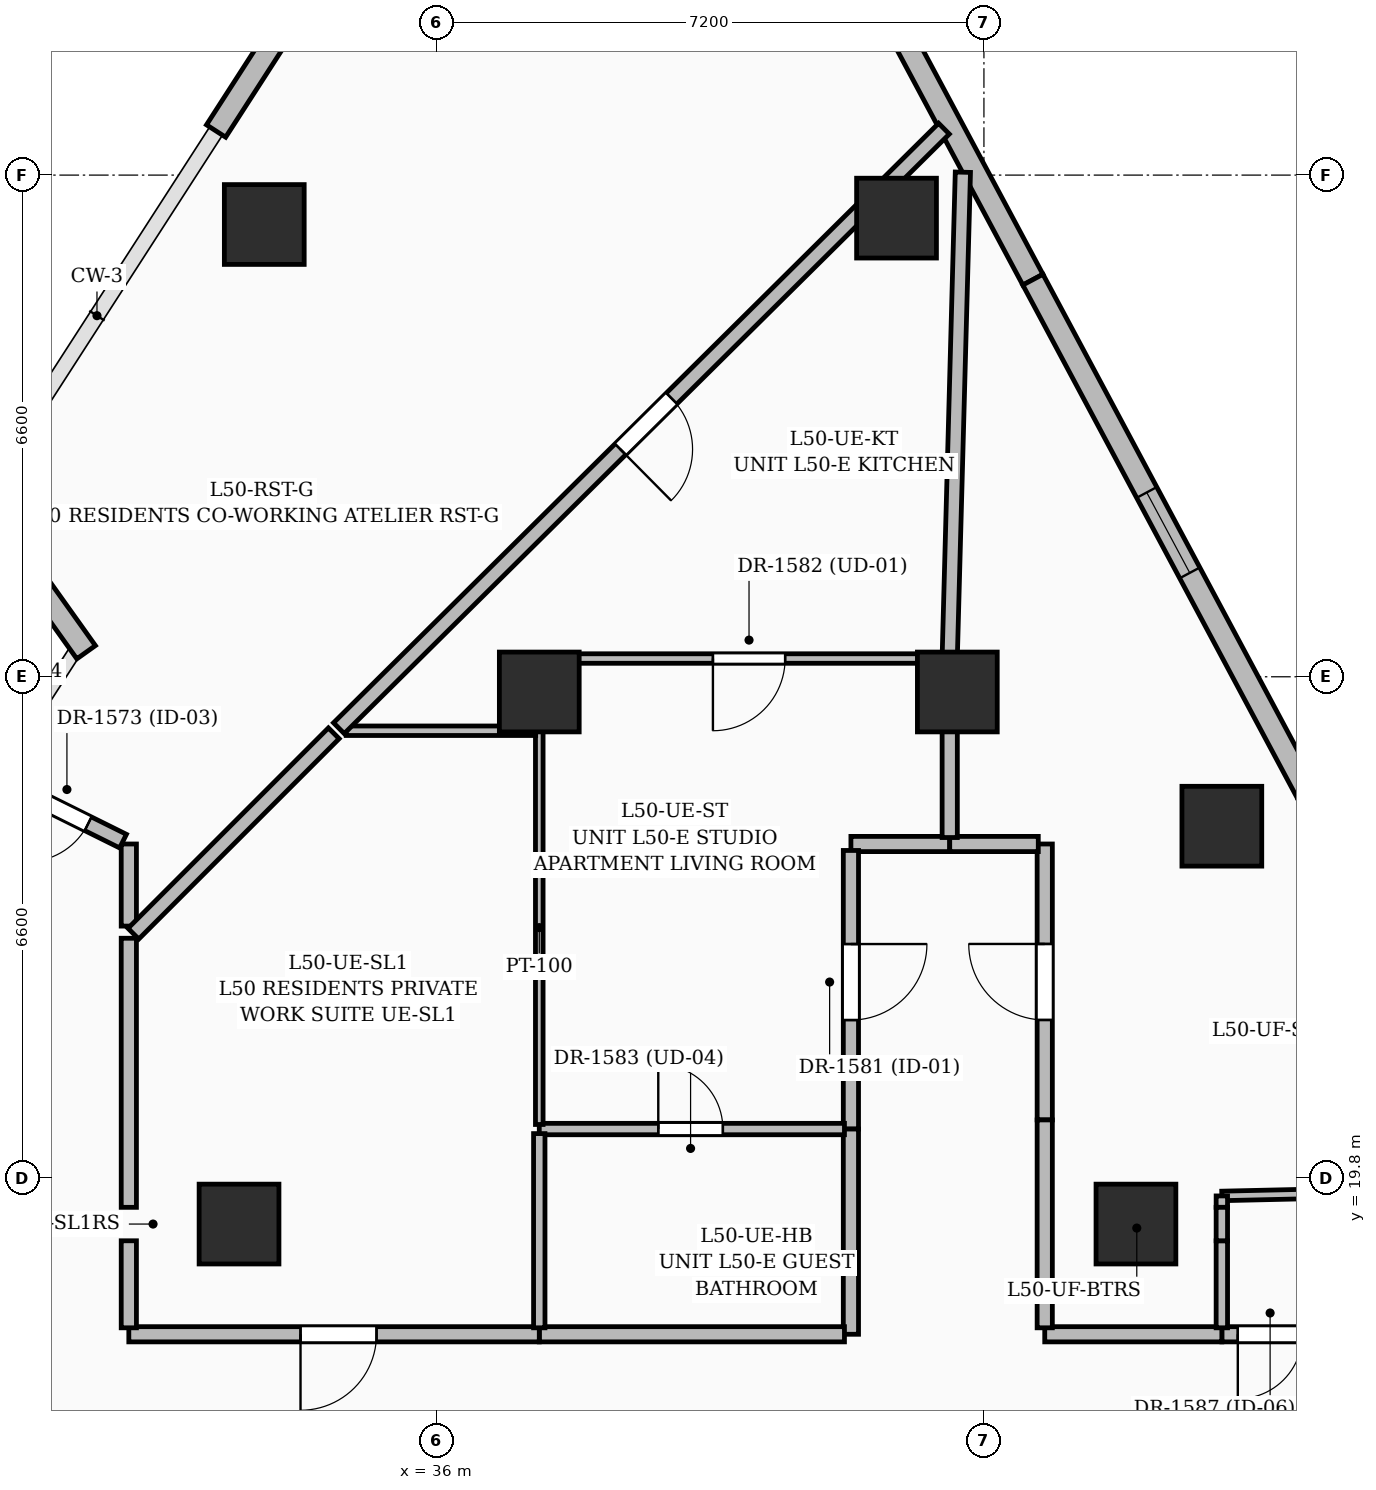
"""IFC4 building model, lengths in metres.
Left out: names, types, materials, properties, quantities, classifications, styles, units other than length and angle.
Written with IfcOpenShell. Run it as: python <this file> out.ifc"""

import sys

from ifc_helpers import new_model, si_unit, direction, frame, frame_2d, origin, origin_2d, place, context, subcontext, project, spatial, rectangle, extrude, element, fill, save


model = new_model("IFC4")
c1 = context("Model", 3, precision=1e-05, world=origin(), true_north=direction((0.0, 1.0)))
c2 = subcontext(c1, "Body", "Model", "MODEL_VIEW")
j1 = project(units=[si_unit("LENGTHUNIT", "METRE"), si_unit("PLANEANGLEUNIT", "RADIAN")], contexts=[c1])
p1 = place(None, origin())
s1 = spatial("IfcSite", under=j1, at=p1, CompositionType="ELEMENT")
p2 = place(p1, origin())
s2 = spatial("IfcBuilding", under=s1, at=p2, CompositionType="ELEMENT")
p3 = place(p2, frame((0.0, 0.0, 193.2)))
s3 = spatial("IfcBuildingStorey", under=s2, at=p3, CompositionType="ELEMENT", Elevation=193.2)
for number, where, z_axis, x_axis in (
    (1, (45.2, 19.2, 0.0), (0.0, 0.0, 1.0), (1.0, 0.0, 0.0)),
    (2, (42.85, 26.2, 0.0), (0.0, 0.0, 1.0), (1.0, 0.0, 0.0)),
    (3, (37.35, 26.2, 0.0), (0.0, 0.0, 1.0), (1.0, 0.0, 0.0)),
    (4, (33.4, 19.2, 0.0), (0.0, 0.0, 1.0), (1.0, 0.0, 0.0)),
    (5, (46.33, 24.434, 0.0), (0.0, 0.0, 1.0), (1.0, 0.0, 0.0)),
    (6, (42.05, 32.434, 0.0), (0.0, 0.0, 1.0), (1.0, 0.0, 0.0)),
    (7, (33.732, 32.35, 0.0), (0.0, 0.0, 1.0), (1.0, 0.0, 0.0)),
):
    element("IfcColumn", number, at=place(p3, frame(where, z_axis=z_axis, x_axis=x_axis)), inside=s3, PredefinedType="COLUMN", context=c2, shape_type="SweptSolid", body=[
        extrude(rectangle(XDim=1.05, YDim=1.05, at=origin_2d()), origin(), (0.0, 0.0, 1.0), 3.6),
    ])
p4 = place(p3, frame((31.388, 26.723, 0.0), z_axis=(0.0, 0.0, 1.0), x_axis=(-0.580409797139, 0.814324546716, 0.0)))
e8 = element("IfcWall", 8, at=p4, inside=s3, PredefinedType="SOLIDWALL", context=c2, shape_type="SweptSolid", body=[
    extrude(rectangle(XDim=2.594, YDim=0.3, at=frame_2d((1.297, 0.0))), origin(), (0.0, 0.0, 1.0), 2.525),
])
p5 = place(p3, frame((33.098, 33.58, 0.0), z_axis=(0.0, 0.0, 1.0), x_axis=(0.542037422538, 0.840354349408, 0.0)))
e9 = element("IfcWall", 9, at=p5, inside=s3, PredefinedType="SOLIDWALL", context=c2, shape_type="SweptSolid", body=[
    extrude(rectangle(XDim=5.782, YDim=0.3, at=frame_2d((2.891, 0.0))), origin(), (0.0, 0.0, 1.0), 3.3),
])
p6 = place(p5, frame((1.8, 0.0, 0.8)))
e10 = element("IfcOpeningElement", 10, at=p6, cuts=e9, PredefinedType="OPENING", context=c2, shape_type="SweptSolid", body=[
    extrude(rectangle(XDim=1.2, YDim=1.8, at=frame_2d((0.6, 0.9))), frame((0.0, 0.16, 0.0), z_axis=(0.0, -1.0, 0.0), x_axis=(1.0, 0.0, 0.0)), (0.0, 0.0, 1.0), 0.32),
])
p7 = place(p3, frame((40.495, 37.885, 0.0), z_axis=(0.0, 0.0, 1.0), x_axis=(0.471731834897, -0.88174206883, 0.0)))
e11 = element("IfcWall", 11, at=p7, inside=s3, PredefinedType="SOLIDWALL", context=c2, shape_type="SweptSolid", body=[
    extrude(rectangle(XDim=7.1, YDim=0.3, at=frame_2d((3.55, 0.0))), origin(), (0.0, 0.0, 1.0), 3.3),
])
p8 = place(p7, frame((2.07, 0.0, 0.6)))
e12 = element("IfcOpeningElement", 12, at=p8, cuts=e11, PredefinedType="OPENING", context=c2, shape_type="SweptSolid", body=[
    extrude(rectangle(XDim=1.5, YDim=2.1, at=frame_2d((0.75, 1.05))), frame((0.0, 0.16, 0.0), z_axis=(0.0, -1.0, 0.0), x_axis=(1.0, 0.0, 0.0)), (0.0, 0.0, 1.0), 0.32),
])
p9 = place(p3, frame((43.844, 31.625, 0.0), z_axis=(0.0, 0.0, 1.0), x_axis=(0.471736169991, -0.881739749542, 0.0)))
e13 = element("IfcWall", 13, at=p9, inside=s3, PredefinedType="SOLIDWALL", context=c2, shape_type="SweptSolid", body=[
    extrude(rectangle(XDim=7.68, YDim=0.3, at=frame_2d((3.84, 0.0))), origin(), (0.0, 0.0, 1.0), 3.3),
])
p10 = place(p9, frame((3.175, 0.0, 0.8)))
e14 = element("IfcOpeningElement", 14, at=p10, cuts=e13, PredefinedType="OPENING", context=c2, shape_type="SweptSolid", body=[
    extrude(rectangle(XDim=1.2, YDim=1.8, at=frame_2d((0.6, 0.9))), frame((0.0, 0.16, 0.0), z_axis=(0.0, -1.0, 0.0), x_axis=(1.0, 0.0, 0.0)), (0.0, 0.0, 1.0), 0.32),
])
p11 = place(p3, frame((42.75, 24.2, 0.0), z_axis=(0.0, 0.0, 1.0), x_axis=(-1.0, 0.0, 0.0)))
e15 = element("IfcWall", 15, at=p11, inside=s3, PredefinedType="PARTITIONING", context=c2, shape_type="SweptSolid", body=[
    extrude(rectangle(XDim=1.3, YDim=0.2, at=frame_2d((0.65, 0.0))), origin(), (0.0, 0.0, 1.0), 3.3),
])
p12 = place(p3, frame((41.45, 24.115, 0.0), z_axis=(0.0, 0.0, 1.0), x_axis=(0.0, -1.0, 0.0)))
e16 = element("IfcWall", 16, at=p12, inside=s3, PredefinedType="PARTITIONING", context=c2, shape_type="SweptSolid", body=[
    extrude(rectangle(XDim=3.665, YDim=0.2, at=frame_2d((1.833, 0.0))), origin(), (0.0, 0.0, 1.0), 3.3),
])
p13 = place(p12, frame((1.231, 0.0, 0.0)))
e17 = element("IfcOpeningElement", 17, at=p13, cuts=e16, PredefinedType="OPENING", context=c2, shape_type="SweptSolid", body=[
    extrude(rectangle(XDim=1.0, YDim=2.2, at=frame_2d((0.5, 1.1))), frame((0.0, 0.11, 0.0), z_axis=(0.0, -1.0, 0.0), x_axis=(1.0, 0.0, 0.0)), (0.0, 0.0, 1.0), 0.22),
])
p14 = place(p3, frame((41.45, 20.45, 0.0), z_axis=(0.0, 0.0, 1.0), x_axis=(0.0, -1.0, 0.0)))
e18 = element("IfcWall", 18, at=p14, inside=s3, PredefinedType="PARTITIONING", context=c2, shape_type="SweptSolid", body=[
    extrude(rectangle(XDim=2.7, YDim=0.2, at=frame_2d((1.35, 0.0))), origin(), (0.0, 0.0, 1.0), 3.3),
])
p15 = place(p3, frame((41.365, 17.75, 0.0), z_axis=(0.0, 0.0, 1.0), x_axis=(-1.0, 0.0, 0.0)))
e19 = element("IfcWall", 19, at=p15, inside=s3, PredefinedType="PARTITIONING", context=c2, shape_type="SweptSolid", body=[
    extrude(rectangle(XDim=4.015, YDim=0.2, at=frame_2d((2.007, 0.0))), origin(), (0.0, 0.0, 1.0), 3.3),
])
p16 = place(p3, frame((37.35, 17.75, 0.0), z_axis=(0.0, 0.0, 1.0), x_axis=(-1.0, 0.0, 0.0)))
e20 = element("IfcWall", 20, at=p16, inside=s3, PredefinedType="PARTITIONING", context=c2, shape_type="SweptSolid", body=[
    extrude(rectangle(XDim=5.4, YDim=0.2, at=frame_2d((2.7, 0.0))), origin(), (0.0, 0.0, 1.0), 2.386),
])
p17 = place(p16, frame((2.141, 0.0, 0.0)))
e21 = element("IfcOpeningElement", 21, at=p17, cuts=e20, PredefinedType="OPENING", context=c2, shape_type="SweptSolid", body=[
    extrude(rectangle(XDim=1.0, YDim=2.2, at=frame_2d((0.5, 1.1))), frame((0.0, 0.11, 0.0), z_axis=(0.0, -1.0, 0.0), x_axis=(1.0, 0.0, 0.0)), (0.0, 0.0, 1.0), 0.22),
])
p18 = place(p3, frame((31.95, 17.835, 0.0), z_axis=(0.0, 0.0, 1.0), x_axis=(0.0, 1.0, 0.0)))
e22 = element("IfcWall", 22, at=p18, inside=s3, PredefinedType="PARTITIONING", context=c2, shape_type="SweptSolid", body=[
    extrude(rectangle(XDim=1.145, YDim=0.2, at=frame_2d((0.573, 0.0))), origin(), (0.0, 0.0, 1.0), 3.3),
])
p19 = place(p3, frame((31.95, 19.42, 0.0), z_axis=(0.0, 0.0, 1.0), x_axis=(0.0, 1.0, 0.0)))
e23 = element("IfcWall", 23, at=p19, inside=s3, PredefinedType="PARTITIONING", context=c2, shape_type="SweptSolid", body=[
    extrude(rectangle(XDim=3.54, YDim=0.2, at=frame_2d((1.77, 0.0))), origin(), (0.0, 0.0, 1.0), 2.414),
])
p20 = place(p3, frame((44.0, 20.57, 0.0), z_axis=(0.0, 0.0, 1.0), x_axis=(0.0, 1.0, 0.0)))
e24 = element("IfcWall", 24, at=p20, inside=s3, PredefinedType="PARTITIONING", context=c2, shape_type="SweptSolid", body=[
    extrude(rectangle(XDim=3.63, YDim=0.2, at=frame_2d((1.815, 0.0))), origin(), (0.0, 0.0, 1.0), 2.386),
])
p21 = place(p20, frame((1.315, 0.0, 0.0)))
e25 = element("IfcOpeningElement", 25, at=p21, cuts=e24, PredefinedType="OPENING", context=c2, shape_type="SweptSolid", body=[
    extrude(rectangle(XDim=1.0, YDim=2.2, at=frame_2d((0.5, 1.1))), frame((0.0, 0.11, 0.0), z_axis=(0.0, -1.0, 0.0), x_axis=(1.0, 0.0, 0.0)), (0.0, 0.0, 1.0), 0.22),
])
p22 = place(p3, frame((43.915, 24.2, 0.0), z_axis=(0.0, 0.0, 1.0), x_axis=(-1.0, 0.0, 0.0)))
e26 = element("IfcWall", 26, at=p22, inside=s3, PredefinedType="PARTITIONING", context=c2, shape_type="SweptSolid", body=[
    extrude(rectangle(XDim=1.165, YDim=0.2, at=frame_2d((0.583, 0.0))), origin(), (0.0, 0.0, 1.0), 2.386),
])
p23 = place(p3, frame((47.515, 17.75, 0.0), z_axis=(0.0, 0.0, 1.0), x_axis=(-1.0, 0.0, 0.0)))
e27 = element("IfcWall", 27, at=p23, inside=s3, PredefinedType="PARTITIONING", context=c2, shape_type="SweptSolid", body=[
    extrude(rectangle(XDim=1.185, YDim=0.2, at=frame_2d((0.592, 0.0))), origin(), (0.0, 0.0, 1.0), 2.721),
])
p24 = place(p23, frame((0.125, 0.0, 0.0)))
e28 = element("IfcOpeningElement", 28, at=p24, cuts=e27, PredefinedType="OPENING", context=c2, shape_type="SweptSolid", body=[
    extrude(rectangle(XDim=0.85, YDim=2.1, at=frame_2d((0.425, 1.05))), frame((0.0, 0.11, 0.0), z_axis=(0.0, -1.0, 0.0), x_axis=(1.0, 0.0, 0.0)), (0.0, 0.0, 1.0), 0.22),
])
p25 = place(p3, frame((46.33, 17.75, 0.0), z_axis=(0.0, 0.0, 1.0), x_axis=(-1.0, 0.0, 0.0)))
e29 = element("IfcWall", 29, at=p25, inside=s3, PredefinedType="PARTITIONING", context=c2, shape_type="SweptSolid", body=[
    extrude(rectangle(XDim=2.33, YDim=0.2, at=frame_2d((1.165, 0.0))), origin(), (0.0, 0.0, 1.0), 2.386),
])
p26 = place(p3, frame((31.95, 23.12, 0.0), z_axis=(0.0, 0.0, 1.0), x_axis=(0.0, 1.0, 0.0)))
e30 = element("IfcWall", 30, at=p26, inside=s3, PredefinedType="PARTITIONING", context=c2, shape_type="SweptSolid", body=[
    extrude(rectangle(XDim=1.08, YDim=0.2, at=frame_2d((0.54, 0.0))), origin(), (0.0, 0.0, 1.0), 2.721),
])
p27 = place(p3, frame((31.874, 24.238, 0.0), z_axis=(0.0, 0.0, 1.0), x_axis=(-0.895738971374, 0.444580358497, 0.0)))
e31 = element("IfcWall", 31, at=p27, inside=s3, PredefinedType="PARTITIONING", context=c2, shape_type="SweptSolid", body=[
    extrude(rectangle(XDim=1.781, YDim=0.2, at=frame_2d((0.891, 0.0))), origin(), (0.0, 0.0, 1.0), 3.3),
])
p28 = place(p27, frame((0.513, 0.0, 0.0)))
e32 = element("IfcOpeningElement", 32, at=p28, cuts=e31, PredefinedType="OPENING", context=c2, shape_type="SweptSolid", body=[
    extrude(rectangle(XDim=0.9, YDim=2.1, at=frame_2d((0.45, 1.05))), frame((0.0, 0.11, 0.0), z_axis=(0.0, -1.0, 0.0), x_axis=(1.0, 0.0, 0.0)), (0.0, 0.0, 1.0), 0.22),
])
p29 = place(p3, frame((37.35, 20.45, 0.0), z_axis=(0.0, 0.0, 1.0), x_axis=(1.0, 0.0, 0.0)))
e33 = element("IfcWall", 33, at=p29, inside=s3, PredefinedType="PARTITIONING", context=c2, shape_type="SweptSolid", body=[
    extrude(rectangle(XDim=4.015, YDim=0.15, at=frame_2d((2.007, 0.0))), origin(), (0.0, 0.0, 1.0), 3.3),
])
p30 = place(p29, frame((1.566, 0.0, 0.0)))
e34 = element("IfcOpeningElement", 34, at=p30, cuts=e33, PredefinedType="OPENING", context=c2, shape_type="SweptSolid", body=[
    extrude(rectangle(XDim=0.85, YDim=2.1, at=frame_2d((0.425, 1.05))), frame((0.0, 0.085, 0.0), z_axis=(0.0, -1.0, 0.0), x_axis=(1.0, 0.0, 0.0)), (0.0, 0.0, 1.0), 0.17),
])
p31 = place(p3, frame((42.75, 26.64, 0.0), z_axis=(0.0, 0.0, 1.0), x_axis=(-1.0, 0.0, 0.0)))
e35 = element("IfcWall", 35, at=p31, inside=s3, PredefinedType="PARTITIONING", context=c2, shape_type="SweptSolid", body=[
    extrude(rectangle(XDim=5.4, YDim=0.125, at=frame_2d((2.7, 0.0))), origin(), (0.0, 0.0, 1.0), 3.3),
])
p32 = place(p31, frame((2.165, 0.0, 0.0)))
e36 = element("IfcOpeningElement", 36, at=p32, cuts=e35, PredefinedType="OPENING", context=c2, shape_type="SweptSolid", body=[
    extrude(rectangle(XDim=0.95, YDim=2.2, at=frame_2d((0.475, 1.1))), frame((0.0, 0.072, 0.0), z_axis=(0.0, -1.0, 0.0), x_axis=(1.0, 0.0, 0.0)), (0.0, 0.0, 1.0), 0.145),
])
p33 = place(p3, frame((37.35, 26.593, 0.0), z_axis=(0.0, 0.0, 1.0), x_axis=(0.0, -1.0, 0.0)))
e37 = element("IfcWall", 37, at=p33, inside=s3, PredefinedType="PARTITIONING", context=c2, shape_type="SweptSolid", body=[
    extrude(rectangle(XDim=0.903, YDim=0.125, at=frame_2d((0.451, 0.0))), origin(), (0.0, 0.0, 1.0), 3.3),
])
p34 = place(p3, frame((37.35, 25.69, 0.0), z_axis=(0.0, 0.0, 1.0), x_axis=(0.0, -1.0, 0.0)))
e38 = element("IfcWall", 38, at=p34, inside=s3, PredefinedType="PARTITIONING", context=c2, shape_type="SweptSolid", body=[
    extrude(rectangle(XDim=5.18, YDim=0.1, at=frame_2d((2.59, 0.0))), origin(), (0.0, 0.0, 1.0), 3.3),
])
p35 = place(p3, frame((42.75, 24.285, 0.0), z_axis=(0.0, 0.0, 1.0), x_axis=(0.0, 1.0, 0.0)))
e39 = element("IfcWall", 39, at=p35, inside=s3, PredefinedType="PARTITIONING", context=c2, shape_type="SweptSolid", body=[
    extrude(rectangle(XDim=2.308, YDim=0.2, at=frame_2d((1.154, 0.0))), origin(), (0.0, 0.0, 1.0), 3.3),
])
p36 = place(p3, frame((37.35, 20.39, 0.0), z_axis=(0.0, 0.0, 1.0), x_axis=(0.0, -1.0, 0.0)))
e40 = element("IfcWall", 40, at=p36, inside=s3, PredefinedType="PARTITIONING", context=c2, shape_type="SweptSolid", body=[
    extrude(rectangle(XDim=2.555, YDim=0.15, at=frame_2d((1.277, 0.0))), origin(), (0.0, 0.0, 1.0), 3.3),
])
p37 = place(p3, frame((34.81, 25.69, 0.0), z_axis=(0.0, 0.0, 1.0), x_axis=(1.0, 0.0, 0.0)))
e41 = element("IfcWall", 41, at=p37, inside=s3, PredefinedType="PARTITIONING", context=c2, shape_type="SweptSolid", body=[
    extrude(rectangle(XDim=2.492, YDim=0.125, at=frame_2d((1.246, 0.0))), origin(), (0.0, 0.0, 1.0), 2.386),
])
p38 = place(p3, frame((42.751, 26.688, 0.0), z_axis=(0.0, 0.0, 1.0), x_axis=(0.027092926653, 0.999632919289, 0.0)))
e42 = element("IfcWall", 42, at=p38, inside=s3, PredefinedType="PARTITIONING", context=c2, shape_type="SweptSolid", body=[
    extrude(rectangle(XDim=6.353, YDim=0.2, at=frame_2d((3.177, 0.0))), origin(), (0.0, 0.0, 1.0), 2.414),
])
p39 = place(p3, frame((42.674, 33.611, 0.0), z_axis=(0.0, 0.0, 1.0), x_axis=(-0.710345403642, -0.703853257096, 0.0)))
e43 = element("IfcWall", 43, at=p39, inside=s3, PredefinedType="PARTITIONING", context=c2, shape_type="SweptSolid", body=[
    extrude(rectangle(XDim=11.207, YDim=0.2, at=frame_2d((5.603, 0.0))), origin(), (0.0, 0.0, 1.0), 2.414),
])
p40 = place(p39, frame((5.043, 0.0, 0.0)))
e44 = element("IfcOpeningElement", 44, at=p40, cuts=e43, PredefinedType="OPENING", context=c2, shape_type="SweptSolid", body=[
    extrude(rectangle(XDim=0.95, YDim=2.2, at=frame_2d((0.475, 1.1))), frame((0.0, 0.11, 0.0), z_axis=(0.0, -1.0, 0.0), x_axis=(1.0, 0.0, 0.0)), (0.0, 0.0, 1.0), 0.22),
])
p41 = place(p3, frame((34.646, 25.656, 0.0), z_axis=(0.0, 0.0, 1.0), x_axis=(-0.707106781187, -0.707106781187, 0.0)))
e45 = element("IfcWall", 45, at=p41, inside=s3, PredefinedType="PARTITIONING", context=c2, shape_type="SweptSolid", body=[
    extrude(rectangle(XDim=3.729, YDim=0.2, at=frame_2d((1.864, 0.0))), origin(), (0.0, 0.0, 1.0), 2.721),
])
p42 = place(p3, frame((46.33, 19.57, 0.0), z_axis=(0.0, 0.0, 1.0), x_axis=(0.999743823458, 0.022633768064, 0.0)))
e46 = element("IfcWall", 46, at=p42, inside=s3, PredefinedType="PARTITIONING", context=c2, shape_type="SweptSolid", body=[
    extrude(rectangle(XDim=3.797, YDim=0.125, at=frame_2d((1.898, 0.0))), origin(), (0.0, 0.0, 1.0), 2.52),
])
p43 = place(p42, frame((1.429, 0.0, 0.0)))
e47 = element("IfcOpeningElement", 47, at=p43, cuts=e46, PredefinedType="OPENING", context=c2, shape_type="SweptSolid", body=[
    extrude(rectangle(XDim=0.95, YDim=2.2, at=frame_2d((0.475, 1.1))), frame((0.0, 0.072, 0.0), z_axis=(0.0, -1.0, 0.0), x_axis=(1.0, 0.0, 0.0)), (0.0, 0.0, 1.0), 0.145),
])
p44 = place(p3, frame((46.33, 18.98, 0.0), z_axis=(0.0, 0.0, 1.0), x_axis=(0.0, -1.0, 0.0)))
e48 = element("IfcWall", 48, at=p44, inside=s3, PredefinedType="PARTITIONING", context=c2, shape_type="SweptSolid", body=[
    extrude(rectangle(XDim=1.145, YDim=0.15, at=frame_2d((0.573, 0.0))), origin(), (0.0, 0.0, 1.0), 2.721),
])
p45 = place(p3, frame((46.33, 19.57, 0.0), z_axis=(0.0, 0.0, 1.0), x_axis=(0.0, -1.0, 0.0)))
e49 = element("IfcWall", 49, at=p45, inside=s3, PredefinedType="PARTITIONING", context=c2, shape_type="SweptSolid", body=[
    extrude(rectangle(XDim=0.15, YDim=0.15, at=frame_2d((0.075, 0.0))), origin(), (0.0, 0.0, 1.0), 3.3),
])
p46 = place(p3, frame((44.0, 17.835, 0.0), z_axis=(0.0, 0.0, 1.0), x_axis=(0.0, 1.0, 0.0)))
e50 = element("IfcWall", 50, at=p46, inside=s3, PredefinedType="PARTITIONING", context=c2, shape_type="SweptSolid", body=[
    extrude(rectangle(XDim=2.735, YDim=0.2, at=frame_2d((1.368, 0.0))), origin(), (0.0, 0.0, 1.0), 3.3),
])
p47 = place(p3, frame((46.33, 19.42, 0.0), z_axis=(0.0, 0.0, 1.0), x_axis=(0.0, -1.0, 0.0)))
e51 = element("IfcWall", 51, at=p47, inside=s3, PredefinedType="PARTITIONING", context=c2, shape_type="SweptSolid", body=[
    extrude(rectangle(XDim=0.44, YDim=0.15, at=frame_2d((0.22, 0.0))), origin(), (0.0, 0.0, 1.0), 2.721),
])
p48 = place(p10, origin())
e52 = element("IfcWindow", 52, at=p48, inside=s3, PartitioningType="SINGLE_PANEL", PredefinedType="WINDOW", context=c2, shape_type="SweptSolid", body=[
    extrude(rectangle(XDim=1.2, YDim=1.8, at=frame_2d((0.6, 0.9))), frame((0.0, 0.03, 0.0), z_axis=(0.0, -1.0, 0.0), x_axis=(1.0, 0.0, 0.0)), (0.0, 0.0, 1.0), 0.06),
])
fill(e14, e52)
p49 = place(p28, origin())
e53 = element("IfcDoor", 53, at=p49, inside=s3, OperationType="SINGLE_SWING_RIGHT", PredefinedType="DOOR", context=c2, shape_type="SweptSolid", body=[
    extrude(rectangle(XDim=0.9, YDim=2.1, at=frame_2d((0.45, 1.05))), frame((0.0, 0.025, 0.0), z_axis=(0.0, -1.0, 0.0), x_axis=(1.0, 0.0, 0.0)), (0.0, 0.0, 1.0), 0.05),
])
fill(e32, e53)
p50 = place(p13, origin())
e54 = element("IfcDoor", 54, at=p50, inside=s3, OperationType="SINGLE_SWING_LEFT", PredefinedType="DOOR", context=c2, shape_type="SweptSolid", body=[
    extrude(rectangle(XDim=1.0, YDim=2.2, at=frame_2d((0.5, 1.1))), frame((0.0, 0.025, 0.0), z_axis=(0.0, -1.0, 0.0), x_axis=(1.0, 0.0, 0.0)), (0.0, 0.0, 1.0), 0.05),
])
fill(e17, e54)
p51 = place(p32, origin())
e55 = element("IfcDoor", 55, at=p51, inside=s3, OperationType="SINGLE_SWING_RIGHT", PredefinedType="DOOR", context=c2, shape_type="SweptSolid", body=[
    extrude(rectangle(XDim=0.95, YDim=2.2, at=frame_2d((0.475, 1.1))), frame((0.0, 0.025, 0.0), z_axis=(0.0, -1.0, 0.0), x_axis=(1.0, 0.0, 0.0)), (0.0, 0.0, 1.0), 0.05),
])
fill(e36, e55)
p52 = place(p30, origin())
e56 = element("IfcDoor", 56, at=p52, inside=s3, OperationType="SINGLE_SWING_LEFT", PredefinedType="DOOR", context=c2, shape_type="SweptSolid", body=[
    extrude(rectangle(XDim=0.85, YDim=2.1, at=frame_2d((0.425, 1.05))), frame((0.0, 0.025, 0.0), z_axis=(0.0, -1.0, 0.0), x_axis=(1.0, 0.0, 0.0)), (0.0, 0.0, 1.0), 0.05),
])
fill(e34, e56)
p53 = place(p21, origin())
e57 = element("IfcDoor", 57, at=p53, inside=s3, OperationType="SINGLE_SWING_RIGHT", PredefinedType="DOOR", context=c2, shape_type="SweptSolid", body=[
    extrude(rectangle(XDim=1.0, YDim=2.2, at=frame_2d((0.5, 1.1))), frame((0.0, 0.025, 0.0), z_axis=(0.0, -1.0, 0.0), x_axis=(1.0, 0.0, 0.0)), (0.0, 0.0, 1.0), 0.05),
])
fill(e25, e57)
p54 = place(p17, origin())
e58 = element("IfcDoor", 58, at=p54, inside=s3, OperationType="SINGLE_SWING_RIGHT", PredefinedType="DOOR", context=c2, shape_type="SweptSolid", body=[
    extrude(rectangle(XDim=1.0, YDim=2.2, at=frame_2d((0.5, 1.1))), frame((0.0, 0.025, 0.0), z_axis=(0.0, -1.0, 0.0), x_axis=(1.0, 0.0, 0.0)), (0.0, 0.0, 1.0), 0.05),
])
fill(e21, e58)
p55 = place(p24, origin())
e59 = element("IfcDoor", 59, at=p55, inside=s3, OperationType="SINGLE_SWING_RIGHT", PredefinedType="DOOR", context=c2, shape_type="SweptSolid", body=[
    extrude(rectangle(XDim=0.85, YDim=2.1, at=frame_2d((0.425, 1.05))), frame((0.0, 0.025, 0.0), z_axis=(0.0, -1.0, 0.0), x_axis=(1.0, 0.0, 0.0)), (0.0, 0.0, 1.0), 0.05),
])
fill(e28, e59)
p56 = place(p40, origin())
e60 = element("IfcDoor", 60, at=p56, inside=s3, OperationType="SINGLE_SWING_RIGHT", PredefinedType="DOOR", context=c2, shape_type="SweptSolid", body=[
    extrude(rectangle(XDim=0.95, YDim=2.2, at=frame_2d((0.475, 1.1))), frame((0.0, 0.025, 0.0), z_axis=(0.0, -1.0, 0.0), x_axis=(1.0, 0.0, 0.0)), (0.0, 0.0, 1.0), 0.05),
])
fill(e44, e60)
save(model, sys.argv[1])
